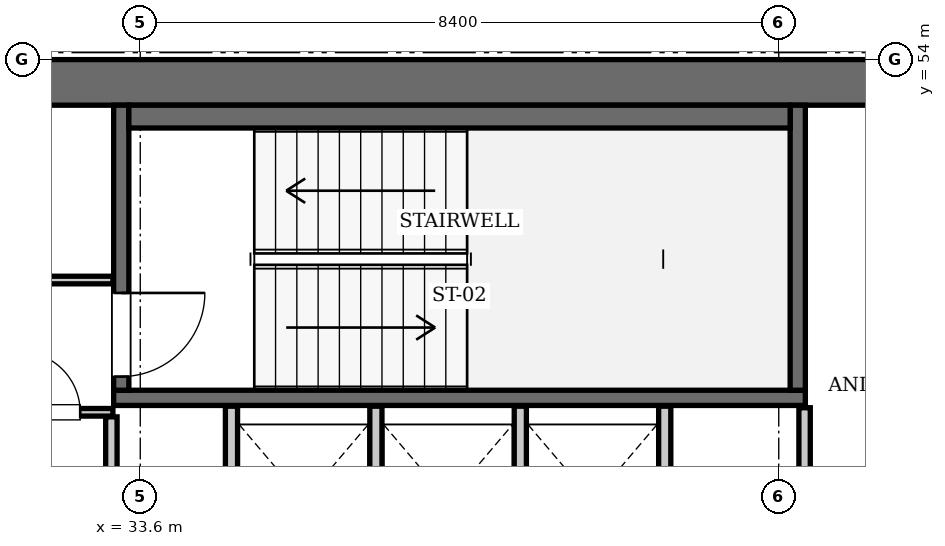
"""IFC4 building model, lengths in metres.
Left out: names, types, materials, properties, quantities, classifications, styles, units other than length and angle.
Written with IfcOpenShell. Run it as: python <this file> out.ifc"""

import sys

from ifc_helpers import new_model, si_unit, direction, frame, frame_2d, origin, place, context, subcontext, project, spatial, rectangle, extrude, element, fill, save


model = new_model("IFC4")
c1 = context("Model", 3, precision=1e-05, world=origin(), true_north=direction((0.0, 1.0)))
c2 = subcontext(c1, "Body", "Model", "MODEL_VIEW")
j1 = project(units=[si_unit("LENGTHUNIT", "METRE"), si_unit("PLANEANGLEUNIT", "RADIAN")], contexts=[c1])
p1 = place(None, origin())
s1 = spatial("IfcSite", under=j1, at=p1, CompositionType="ELEMENT")
p2 = place(p1, origin())
s2 = spatial("IfcBuilding", under=s1, at=p2, CompositionType="ELEMENT")
p3 = place(p2, frame((0.0, 0.0, 262.5)))
s3 = spatial("IfcBuildingStorey", under=s2, at=p3, CompositionType="ELEMENT", Elevation=262.5)
p4 = place(p3, frame((25.2, 53.7, 0.0), z_axis=(0.0, 0.0, 1.0), x_axis=(1.0, 0.0, 0.0)))
e1 = element("IfcWall", 1, at=p4, inside=s3, PredefinedType="SHEAR", context=c2, shape_type="SweptSolid", body=[
    extrude(rectangle(XDim=25.2, YDim=0.6, at=frame_2d((12.6, 0.0))), origin(), (0.0, 0.0, 1.0), 3.85),
])
p5 = place(p3, frame((33.25, 49.55, 0.0), z_axis=(0.0, 0.0, 1.0), x_axis=(1.0, 0.0, 0.0)))
e2 = element("IfcWall", 2, at=p5, inside=s3, PredefinedType="SOLIDWALL", context=c2, shape_type="SweptSolid", body=[
    extrude(rectangle(XDim=9.1, YDim=0.2, at=frame_2d((4.55, 0.0))), origin(), (0.0, 0.0, 1.0), 3.61),
])
p6 = place(p3, frame((42.25, 49.65, 0.0), z_axis=(0.0, 0.0, 1.0), x_axis=(0.0, 1.0, 0.0)))
e3 = element("IfcWall", 3, at=p6, inside=s3, PredefinedType="SOLIDWALL", context=c2, shape_type="SweptSolid", body=[
    extrude(rectangle(XDim=3.75, YDim=0.2, at=frame_2d((1.875, 0.0))), origin(), (0.0, 0.0, 1.0), 3.61),
])
p7 = place(p3, frame((33.35, 49.65, 0.0), z_axis=(0.0, 0.0, 1.0), x_axis=(0.0, 1.0, 0.0)))
e4 = element("IfcWall", 4, at=p7, inside=s3, PredefinedType="SOLIDWALL", context=c2, shape_type="SweptSolid", body=[
    extrude(rectangle(XDim=3.75, YDim=0.2, at=frame_2d((1.875, 0.0))), origin(), (0.0, 0.0, 1.0), 3.61),
])
p8 = place(p7, frame((0.18, 0.0, 0.0)))
e5 = element("IfcOpeningElement", 5, at=p8, cuts=e4, PredefinedType="OPENING", context=c2, shape_type="SweptSolid", body=[
    extrude(rectangle(XDim=1.1, YDim=2.15, at=frame_2d((0.55, 1.075))), frame((0.0, 0.11, 0.0), z_axis=(0.0, -1.0, 0.0), x_axis=(1.0, 0.0, 0.0)), (0.0, 0.0, 1.0), 0.22),
])
p9 = place(p3, frame((33.45, 53.25, 0.0), z_axis=(0.0, 0.0, 1.0), x_axis=(1.0, 0.0, 0.0)))
e6 = element("IfcWall", 6, at=p9, inside=s3, PredefinedType="SOLIDWALL", context=c2, shape_type="SweptSolid", body=[
    extrude(rectangle(XDim=8.7, YDim=0.3, at=frame_2d((4.35, 0.0))), origin(), (0.0, 0.0, 1.0), 3.61),
])
for number, where, z_axis, x_axis in (
    (7, (34.8, 47.25, 0.0), (0.0, 0.0, 1.0), (0.0, 1.0, 0.0)),
    (8, (36.7, 47.25, 0.0), (0.0, 0.0, 1.0), (0.0, 1.0, 0.0)),
    (9, (38.6, 47.25, 0.0), (0.0, 0.0, 1.0), (0.0, 1.0, 0.0)),
    (10, (40.5, 47.25, 0.0), (0.0, 0.0, 1.0), (0.0, 1.0, 0.0)),
):
    element("IfcWall", number, at=place(p3, frame(where, z_axis=z_axis, x_axis=x_axis)), inside=s3, PredefinedType="SOLIDWALL", context=c2, shape_type="SweptSolid", body=[
        extrude(rectangle(XDim=2.19, YDim=0.16, at=frame_2d((1.095, 0.0))), origin(), (0.0, 0.0, 1.0), 3.61),
    ])
p10 = place(p3, frame((33.22, 45.14, 0.0), z_axis=(0.0, 0.0, 1.0), x_axis=(0.0, 1.0, 0.0)))
e11 = element("IfcWall", 11, at=p10, inside=s3, PredefinedType="PARTITIONING", context=c2, shape_type="SweptSolid", body=[
    extrude(rectangle(XDim=4.16, YDim=0.15, at=frame_2d((2.08, 0.0))), origin(), (0.0, 0.0, 1.0), 3.61),
])
p11 = place(p3, frame((30.06, 49.36, 0.0), z_axis=(0.0, 0.0, 1.0), x_axis=(1.0, 0.0, 0.0)))
e12 = element("IfcWall", 12, at=p11, inside=s3, PredefinedType="PARTITIONING", context=c2, shape_type="SweptSolid", body=[
    extrude(rectangle(XDim=3.18, YDim=0.1, at=frame_2d((1.59, 0.0))), origin(), (0.0, 0.0, 1.0), 3.61),
])
p12 = place(p11, frame((1.95, 0.0, 0.0)))
e13 = element("IfcOpeningElement", 13, at=p12, cuts=e12, PredefinedType="OPENING", context=c2, shape_type="SweptSolid", body=[
    extrude(rectangle(XDim=0.8, YDim=2.05, at=frame_2d((0.4, 1.025))), frame((0.0, 0.06, 0.0), z_axis=(0.0, -1.0, 0.0), x_axis=(1.0, 0.0, 0.0)), (0.0, 0.0, 1.0), 0.12),
])
p13 = place(p3, frame((31.82, 51.1, 0.0), z_axis=(0.0, 0.0, 1.0), x_axis=(1.0, 0.0, 0.0)))
e14 = element("IfcWall", 14, at=p13, inside=s3, PredefinedType="PARTITIONING", context=c2, shape_type="SweptSolid", body=[
    extrude(rectangle(XDim=1.42, YDim=0.1, at=frame_2d((0.71, 0.0))), origin(), (0.0, 0.0, 1.0), 3.61),
])
p14 = place(p3, frame((42.34, 46.96, 0.0), z_axis=(0.0, 0.0, 1.0), x_axis=(0.0, 1.0, 0.0)))
e15 = element("IfcWall", 15, at=p14, inside=s3, PredefinedType="PARTITIONING", context=c2, shape_type="SweptSolid", body=[
    extrude(rectangle(XDim=2.46, YDim=0.15, at=frame_2d((1.23, 0.0))), origin(), (0.0, 0.0, 1.0), 3.61),
])
p15 = place(p14, frame((0.24, 0.0, 0.0)))
e16 = element("IfcOpeningElement", 16, at=p15, cuts=e15, PredefinedType="OPENING", context=c2, shape_type="SweptSolid", body=[
    extrude(rectangle(XDim=0.8, YDim=2.05, at=frame_2d((0.4, 1.025))), frame((0.0, 0.085, 0.0), z_axis=(0.0, -1.0, 0.0), x_axis=(1.0, 0.0, 0.0)), (0.0, 0.0, 1.0), 0.17),
])
p16 = place(p8, frame((1.1, 0.0, 0.0), z_axis=(0.0, 0.0, 1.0), x_axis=(-1.0, 0.0, 0.0)))
e17 = element("IfcDoor", 17, at=p16, inside=s3, OperationType="SINGLE_SWING_LEFT", PredefinedType="DOOR", context=c2, shape_type="SweptSolid", body=[
    extrude(rectangle(XDim=1.1, YDim=2.15, at=frame_2d((0.55, 1.075))), frame((0.0, 0.025, 0.0), z_axis=(0.0, -1.0, 0.0), x_axis=(1.0, 0.0, 0.0)), (0.0, 0.0, 1.0), 0.05),
])
fill(e5, e17)
p17 = place(p12, origin())
e18 = element("IfcDoor", 18, at=p17, inside=s3, OperationType="SINGLE_SWING_LEFT", PredefinedType="DOOR", context=c2, shape_type="SweptSolid", body=[
    extrude(rectangle(XDim=0.8, YDim=2.05, at=frame_2d((0.4, 1.025))), frame((0.0, 0.025, 0.0), z_axis=(0.0, -1.0, 0.0), x_axis=(1.0, 0.0, 0.0)), (0.0, 0.0, 1.0), 0.05),
])
fill(e13, e18)
save(model, sys.argv[1])
